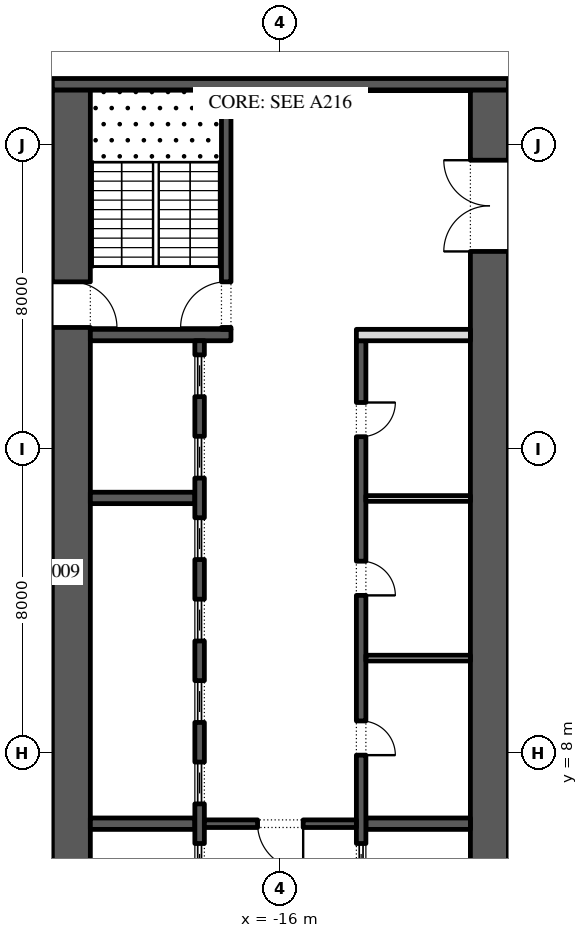
"""IFC4 building model, lengths in metres.
Left out: names, types, materials, properties, quantities, classifications, styles, units other than length and angle.
Written with IfcOpenShell. Run it as: python <this file> out.ifc"""

import sys

from ifc_helpers import new_model, si_unit, direction, frame, frame_2d, origin, place, context, subcontext, project, spatial, rectangle, extrude, element, fill, save


model = new_model("IFC4")
c1 = context("Model", 3, precision=1e-05, world=origin(), true_north=direction((0.0, 1.0)))
c2 = subcontext(c1, "Body", "Model", "MODEL_VIEW")
j1 = project(units=[si_unit("LENGTHUNIT", "METRE"), si_unit("PLANEANGLEUNIT", "RADIAN")], contexts=[c1])
p1 = place(None, origin())
s1 = spatial("IfcSite", under=j1, at=p1, CompositionType="ELEMENT")
p2 = place(p1, origin())
s2 = spatial("IfcBuilding", under=s1, at=p2, CompositionType="ELEMENT")
p3 = place(p2, frame((0.0, 0.0, 64.8)))
s3 = spatial("IfcBuildingStorey", under=s2, at=p3, CompositionType="ELEMENT", Elevation=64.8)
p4 = place(p3, frame((-21.5, -2.45, 0.0), z_axis=(0.0, 0.0, 1.0), x_axis=(0.0, 1.0, 0.0)))
e1 = element("IfcWall", 1, at=p4, inside=s3, PredefinedType="SHEAR", context=c2, shape_type="SweptSolid", body=[
    extrude(rectangle(XDim=27.9, YDim=1.0, at=frame_2d((13.95, 0.0))), origin(), (0.0, 0.0, 1.0), 4.0),
])
p5 = place(p4, frame((5.05, 0.0, 0.0)))
e2 = element("IfcOpeningElement", 2, at=p5, cuts=e1, PredefinedType="OPENING", context=c2, shape_type="SweptSolid", body=[
    extrude(rectangle(XDim=1.2, YDim=2.1, at=frame_2d((0.6, 1.05))), frame((0.0, 0.51, 0.0), z_axis=(0.0, -1.0, 0.0), x_axis=(1.0, 0.0, 0.0)), (0.0, 0.0, 1.0), 1.02),
])
p6 = place(p4, frame((21.65, 0.0, 0.0)))
e3 = element("IfcOpeningElement", 3, at=p6, cuts=e1, PredefinedType="OPENING", context=c2, shape_type="SweptSolid", body=[
    extrude(rectangle(XDim=1.2, YDim=2.1, at=frame_2d((0.6, 1.05))), frame((0.0, 0.51, 0.0), z_axis=(0.0, -1.0, 0.0), x_axis=(1.0, 0.0, 0.0)), (0.0, 0.0, 1.0), 1.02),
])
p7 = place(p3, frame((-10.5, -2.45, 0.0), z_axis=(0.0, 0.0, 1.0), x_axis=(0.0, 1.0, 0.0)))
e4 = element("IfcWall", 4, at=p7, inside=s3, PredefinedType="SHEAR", context=c2, shape_type="SweptSolid", body=[
    extrude(rectangle(XDim=27.9, YDim=1.0, at=frame_2d((13.95, 0.0))), origin(), (0.0, 0.0, 1.0), 4.0),
])
p8 = place(p7, frame((23.65, 0.0, 0.0)))
e5 = element("IfcOpeningElement", 5, at=p8, cuts=e4, PredefinedType="OPENING", context=c2, shape_type="SweptSolid", body=[
    extrude(rectangle(XDim=2.4, YDim=2.1, at=frame_2d((1.2, 1.05))), frame((0.0, 0.51, 0.0), z_axis=(0.0, -1.0, 0.0), x_axis=(1.0, 0.0, 0.0)), (0.0, 0.0, 1.0), 1.02),
])
p9 = place(p7, frame((0.788, 0.0, 0.0)))
e6 = element("IfcOpeningElement", 6, at=p9, cuts=e4, PredefinedType="OPENING", context=c2, shape_type="SweptSolid", body=[
    extrude(rectangle(XDim=0.9, YDim=2.1, at=frame_2d((0.45, 1.05))), frame((0.0, 0.51, 0.0), z_axis=(0.0, -1.0, 0.0), x_axis=(1.0, 0.0, 0.0)), (0.0, 0.0, 1.0), 1.02),
])
p10 = place(p7, frame((4.012, 0.0, 0.0)))
e7 = element("IfcOpeningElement", 7, at=p10, cuts=e4, PredefinedType="OPENING", context=c2, shape_type="SweptSolid", body=[
    extrude(rectangle(XDim=0.9, YDim=2.1, at=frame_2d((0.45, 1.05))), frame((0.0, 0.51, 0.0), z_axis=(0.0, -1.0, 0.0), x_axis=(1.0, 0.0, 0.0)), (0.0, 0.0, 1.0), 1.02),
])
p11 = place(p3, frame((-22.0, 25.6, 0.0), z_axis=(0.0, 0.0, 1.0), x_axis=(1.0, 0.0, 0.0)))
e8 = element("IfcWall", 8, at=p11, inside=s3, PredefinedType="SHEAR", context=c2, shape_type="SweptSolid", body=[
    extrude(rectangle(XDim=12.0, YDim=0.3, at=frame_2d((6.0, 0.0))), origin(), (0.0, 0.0, 1.0), 4.0),
])
p12 = place(p3, frame((-21.0, 19.0, 0.0), z_axis=(0.0, 0.0, 1.0), x_axis=(1.0, 0.0, 0.0)))
e9 = element("IfcWall", 9, at=p12, inside=s3, PredefinedType="SHEAR", context=c2, shape_type="SweptSolid", body=[
    extrude(rectangle(XDim=3.7, YDim=0.3, at=frame_2d((1.85, 0.0))), origin(), (0.0, 0.0, 1.0), 4.0),
])
p13 = place(p3, frame((-17.425, 19.15, 0.0), z_axis=(0.0, 0.0, 1.0), x_axis=(0.0, 1.0, 0.0)))
e10 = element("IfcWall", 10, at=p13, inside=s3, PredefinedType="SHEAR", context=c2, shape_type="SweptSolid", body=[
    extrude(rectangle(XDim=6.3, YDim=0.25, at=frame_2d((3.15, 0.0))), origin(), (0.0, 0.0, 1.0), 4.0),
])
p14 = place(p13, frame((0.05, 0.0, 0.0)))
e11 = element("IfcOpeningElement", 11, at=p14, cuts=e10, PredefinedType="OPENING", context=c2, shape_type="SweptSolid", body=[
    extrude(rectangle(XDim=1.2, YDim=2.1, at=frame_2d((0.6, 1.05))), frame((0.0, 0.135, 0.0), z_axis=(0.0, -1.0, 0.0), x_axis=(1.0, 0.0, 0.0)), (0.0, 0.0, 1.0), 0.27),
])
for number, where, z_axis, x_axis in (
    (12, (-21.0, 6.143, 0.0), (0.0, 0.0, 1.0), (1.0, 0.0, 0.0)),
    (13, (-21.0, 14.714, 0.0), (0.0, 0.0, 1.0), (1.0, 0.0, 0.0)),
):
    element("IfcWall", number, at=place(p3, frame(where, z_axis=z_axis, x_axis=x_axis)), inside=s3, PredefinedType="SHEAR", context=c2, shape_type="SweptSolid", body=[
        extrude(rectangle(XDim=2.75, YDim=0.3, at=frame_2d((1.375, 0.0))), origin(), (0.0, 0.0, 1.0), 4.0),
    ])
p15 = place(p3, frame((-18.125, 4.15, 0.0), z_axis=(0.0, 0.0, 1.0), x_axis=(0.0, 1.0, 0.0)))
e14 = element("IfcWall", 14, at=p15, inside=s3, PredefinedType="SHEAR", context=c2, shape_type="SweptSolid", body=[
    extrude(rectangle(XDim=14.7, YDim=0.25, at=frame_2d((7.35, 0.0))), origin(), (0.0, 0.0, 1.0), 4.0),
])
p16 = place(p15, frame((0.371, 0.0, 0.0)))
e15 = element("IfcOpeningElement", 15, at=p16, cuts=e14, PredefinedType="OPENING", context=c2, shape_type="SweptSolid", body=[
    extrude(rectangle(XDim=1.1, YDim=2.1, at=frame_2d((0.55, 1.05))), frame((0.0, 0.135, 0.0), z_axis=(0.0, -1.0, 0.0), x_axis=(1.0, 0.0, 0.0)), (0.0, 0.0, 1.0), 0.27),
])
p17 = place(p15, frame((2.514, 0.0, 0.0)))
e16 = element("IfcOpeningElement", 16, at=p17, cuts=e14, PredefinedType="OPENING", context=c2, shape_type="SweptSolid", body=[
    extrude(rectangle(XDim=1.1, YDim=2.1, at=frame_2d((0.55, 1.05))), frame((0.0, 0.135, 0.0), z_axis=(0.0, -1.0, 0.0), x_axis=(1.0, 0.0, 0.0)), (0.0, 0.0, 1.0), 0.27),
])
p18 = place(p15, frame((4.657, 0.0, 0.0)))
e17 = element("IfcOpeningElement", 17, at=p18, cuts=e14, PredefinedType="OPENING", context=c2, shape_type="SweptSolid", body=[
    extrude(rectangle(XDim=1.1, YDim=2.1, at=frame_2d((0.55, 1.05))), frame((0.0, 0.135, 0.0), z_axis=(0.0, -1.0, 0.0), x_axis=(1.0, 0.0, 0.0)), (0.0, 0.0, 1.0), 0.27),
])
p19 = place(p15, frame((6.8, 0.0, 0.0)))
e18 = element("IfcOpeningElement", 18, at=p19, cuts=e14, PredefinedType="OPENING", context=c2, shape_type="SweptSolid", body=[
    extrude(rectangle(XDim=1.1, YDim=2.1, at=frame_2d((0.55, 1.05))), frame((0.0, 0.135, 0.0), z_axis=(0.0, -1.0, 0.0), x_axis=(1.0, 0.0, 0.0)), (0.0, 0.0, 1.0), 0.27),
])
p20 = place(p15, frame((8.943, 0.0, 0.0)))
e19 = element("IfcOpeningElement", 19, at=p20, cuts=e14, PredefinedType="OPENING", context=c2, shape_type="SweptSolid", body=[
    extrude(rectangle(XDim=1.1, YDim=2.1, at=frame_2d((0.55, 1.05))), frame((0.0, 0.135, 0.0), z_axis=(0.0, -1.0, 0.0), x_axis=(1.0, 0.0, 0.0)), (0.0, 0.0, 1.0), 0.27),
])
p21 = place(p15, frame((11.086, 0.0, 0.0)))
e20 = element("IfcOpeningElement", 20, at=p21, cuts=e14, PredefinedType="OPENING", context=c2, shape_type="SweptSolid", body=[
    extrude(rectangle(XDim=1.1, YDim=2.1, at=frame_2d((0.55, 1.05))), frame((0.0, 0.135, 0.0), z_axis=(0.0, -1.0, 0.0), x_axis=(1.0, 0.0, 0.0)), (0.0, 0.0, 1.0), 0.27),
])
p22 = place(p15, frame((13.229, 0.0, 0.0)))
e21 = element("IfcOpeningElement", 21, at=p22, cuts=e14, PredefinedType="OPENING", context=c2, shape_type="SweptSolid", body=[
    extrude(rectangle(XDim=1.1, YDim=2.1, at=frame_2d((0.55, 1.05))), frame((0.0, 0.135, 0.0), z_axis=(0.0, -1.0, 0.0), x_axis=(1.0, 0.0, 0.0)), (0.0, 0.0, 1.0), 0.27),
])
p23 = place(p3, frame((-13.75, 6.143, 0.0), z_axis=(0.0, 0.0, 1.0), x_axis=(1.0, 0.0, 0.0)))
e22 = element("IfcWall", 22, at=p23, inside=s3, PredefinedType="SHEAR", context=c2, shape_type="SweptSolid", body=[
    extrude(rectangle(XDim=2.75, YDim=0.3, at=frame_2d((1.375, 0.0))), origin(), (0.0, 0.0, 1.0), 4.0),
])
p24 = place(p3, frame((-13.875, -2.45, 0.0), z_axis=(0.0, 0.0, 1.0), x_axis=(0.0, 1.0, 0.0)))
e23 = element("IfcWall", 23, at=p24, inside=s3, PredefinedType="SHEAR", context=c2, shape_type="SweptSolid", body=[
    extrude(rectangle(XDim=21.3, YDim=0.25, at=frame_2d((10.65, 0.0))), origin(), (0.0, 0.0, 1.0), 4.0),
])
p25 = place(p24, frame((10.396, 0.0, 0.0)))
e24 = element("IfcOpeningElement", 24, at=p25, cuts=e23, PredefinedType="OPENING", context=c2, shape_type="SweptSolid", body=[
    extrude(rectangle(XDim=0.9, YDim=2.1, at=frame_2d((0.45, 1.05))), frame((0.0, 0.135, 0.0), z_axis=(0.0, -1.0, 0.0), x_axis=(1.0, 0.0, 0.0)), (0.0, 0.0, 1.0), 0.27),
])
p26 = place(p24, frame((14.6, 0.0, 0.0)))
e25 = element("IfcOpeningElement", 25, at=p26, cuts=e23, PredefinedType="OPENING", context=c2, shape_type="SweptSolid", body=[
    extrude(rectangle(XDim=0.9, YDim=2.1, at=frame_2d((0.45, 1.05))), frame((0.0, 0.135, 0.0), z_axis=(0.0, -1.0, 0.0), x_axis=(1.0, 0.0, 0.0)), (0.0, 0.0, 1.0), 0.27),
])
p27 = place(p24, frame((18.775, 0.0, 0.0)))
e26 = element("IfcOpeningElement", 26, at=p27, cuts=e23, PredefinedType="OPENING", context=c2, shape_type="SweptSolid", body=[
    extrude(rectangle(XDim=0.9, YDim=2.1, at=frame_2d((0.45, 1.05))), frame((0.0, 0.135, 0.0), z_axis=(0.0, -1.0, 0.0), x_axis=(1.0, 0.0, 0.0)), (0.0, 0.0, 1.0), 0.27),
])
p28 = place(p24, frame((6.971, 0.0, 0.0)))
e27 = element("IfcOpeningElement", 27, at=p28, cuts=e23, PredefinedType="OPENING", context=c2, shape_type="SweptSolid", body=[
    extrude(rectangle(XDim=1.1, YDim=2.1, at=frame_2d((0.55, 1.05))), frame((0.0, 0.135, 0.0), z_axis=(0.0, -1.0, 0.0), x_axis=(1.0, 0.0, 0.0)), (0.0, 0.0, 1.0), 0.27),
])
p29 = place(p3, frame((-14.0, 19.0, 0.0), z_axis=(0.0, 0.0, 1.0), x_axis=(1.0, 0.0, 0.0)))
e28 = element("IfcWall", 28, at=p29, inside=s3, PredefinedType="PARTITIONING", context=c2, shape_type="SweptSolid", body=[
    extrude(rectangle(XDim=3.0, YDim=0.3, at=frame_2d((1.5, 0.0))), origin(), (0.0, 0.0, 1.0), 4.0),
])
for number, where, z_axis, x_axis in (
    (29, (-13.75, 10.5, 0.0), (0.0, 0.0, 1.0), (1.0, 0.0, 0.0)),
    (30, (-13.75, 14.7, 0.0), (0.0, 0.0, 1.0), (1.0, 0.0, 0.0)),
):
    element("IfcWall", number, at=place(p3, frame(where, z_axis=z_axis, x_axis=x_axis)), inside=s3, PredefinedType="PARTITIONING", context=c2, shape_type="SweptSolid", body=[
        extrude(rectangle(XDim=2.75, YDim=0.15, at=frame_2d((1.375, 0.0))), origin(), (0.0, 0.0, 1.0), 4.0),
    ])
p30 = place(p3, frame((-18.0, 6.143, 0.0), z_axis=(0.0, 0.0, 1.0), x_axis=(1.0, 0.0, 0.0)))
e31 = element("IfcWall", 31, at=p30, inside=s3, PredefinedType="SHEAR", context=c2, shape_type="SweptSolid", body=[
    extrude(rectangle(XDim=4.0, YDim=0.2, at=frame_2d((2.0, 0.0))), origin(), (0.0, 0.0, 1.0), 4.0),
])
p31 = place(p30, frame((1.4, 0.0, 0.0)))
e32 = element("IfcOpeningElement", 32, at=p31, cuts=e31, PredefinedType="OPENING", context=c2, shape_type="SweptSolid", body=[
    extrude(rectangle(XDim=1.2, YDim=2.1, at=frame_2d((0.6, 1.05))), frame((0.0, 0.11, 0.0), z_axis=(0.0, -1.0, 0.0), x_axis=(1.0, 0.0, 0.0)), (0.0, 0.0, 1.0), 0.22),
])
p32 = place(p16, origin())
e33 = element("IfcDoor", 33, at=p32, inside=s3, OperationType="SLIDING_TO_LEFT", PredefinedType="DOOR", context=c2, shape_type="SweptSolid", body=[
    extrude(rectangle(XDim=1.1, YDim=2.1, at=frame_2d((0.55, 1.05))), frame((0.0, 0.025, 0.0), z_axis=(0.0, -1.0, 0.0), x_axis=(1.0, 0.0, 0.0)), (0.0, 0.0, 1.0), 0.05),
])
fill(e15, e33)
p33 = place(p17, origin())
e34 = element("IfcDoor", 34, at=p33, inside=s3, OperationType="SLIDING_TO_LEFT", PredefinedType="DOOR", context=c2, shape_type="SweptSolid", body=[
    extrude(rectangle(XDim=1.1, YDim=2.1, at=frame_2d((0.55, 1.05))), frame((0.0, 0.025, 0.0), z_axis=(0.0, -1.0, 0.0), x_axis=(1.0, 0.0, 0.0)), (0.0, 0.0, 1.0), 0.05),
])
fill(e16, e34)
p34 = place(p18, origin())
e35 = element("IfcDoor", 35, at=p34, inside=s3, OperationType="SLIDING_TO_LEFT", PredefinedType="DOOR", context=c2, shape_type="SweptSolid", body=[
    extrude(rectangle(XDim=1.1, YDim=2.1, at=frame_2d((0.55, 1.05))), frame((0.0, 0.025, 0.0), z_axis=(0.0, -1.0, 0.0), x_axis=(1.0, 0.0, 0.0)), (0.0, 0.0, 1.0), 0.05),
])
fill(e17, e35)
p35 = place(p19, origin())
e36 = element("IfcDoor", 36, at=p35, inside=s3, OperationType="SLIDING_TO_LEFT", PredefinedType="DOOR", context=c2, shape_type="SweptSolid", body=[
    extrude(rectangle(XDim=1.1, YDim=2.1, at=frame_2d((0.55, 1.05))), frame((0.0, 0.025, 0.0), z_axis=(0.0, -1.0, 0.0), x_axis=(1.0, 0.0, 0.0)), (0.0, 0.0, 1.0), 0.05),
])
fill(e18, e36)
p36 = place(p20, origin())
e37 = element("IfcDoor", 37, at=p36, inside=s3, OperationType="SLIDING_TO_LEFT", PredefinedType="DOOR", context=c2, shape_type="SweptSolid", body=[
    extrude(rectangle(XDim=1.1, YDim=2.1, at=frame_2d((0.55, 1.05))), frame((0.0, 0.025, 0.0), z_axis=(0.0, -1.0, 0.0), x_axis=(1.0, 0.0, 0.0)), (0.0, 0.0, 1.0), 0.05),
])
fill(e19, e37)
p37 = place(p21, origin())
e38 = element("IfcDoor", 38, at=p37, inside=s3, OperationType="SLIDING_TO_LEFT", PredefinedType="DOOR", context=c2, shape_type="SweptSolid", body=[
    extrude(rectangle(XDim=1.1, YDim=2.1, at=frame_2d((0.55, 1.05))), frame((0.0, 0.025, 0.0), z_axis=(0.0, -1.0, 0.0), x_axis=(1.0, 0.0, 0.0)), (0.0, 0.0, 1.0), 0.05),
])
fill(e20, e38)
p38 = place(p22, origin())
e39 = element("IfcDoor", 39, at=p38, inside=s3, OperationType="SLIDING_TO_LEFT", PredefinedType="DOOR", context=c2, shape_type="SweptSolid", body=[
    extrude(rectangle(XDim=1.1, YDim=2.1, at=frame_2d((0.55, 1.05))), frame((0.0, 0.025, 0.0), z_axis=(0.0, -1.0, 0.0), x_axis=(1.0, 0.0, 0.0)), (0.0, 0.0, 1.0), 0.05),
])
fill(e21, e39)
p39 = place(p25, frame((0.9, -0.2, 0.0), z_axis=(0.0, 0.0, 1.0), x_axis=(-1.0, 0.0, 0.0)))
e40 = element("IfcDoor", 40, at=p39, inside=s3, OperationType="SINGLE_SWING_LEFT", PredefinedType="DOOR", context=c2, shape_type="SweptSolid", body=[
    extrude(rectangle(XDim=0.9, YDim=2.1, at=frame_2d((0.45, 1.05))), frame((0.0, -0.075, 0.0), z_axis=(0.0, -1.0, 0.0), x_axis=(1.0, 0.0, 0.0)), (0.0, 0.0, 1.0), 0.05),
])
fill(e24, e40)
p40 = place(p26, frame((0.9, -0.2, 0.0), z_axis=(0.0, 0.0, 1.0), x_axis=(-1.0, 0.0, 0.0)))
e41 = element("IfcDoor", 41, at=p40, inside=s3, OperationType="SINGLE_SWING_LEFT", PredefinedType="DOOR", context=c2, shape_type="SweptSolid", body=[
    extrude(rectangle(XDim=0.9, YDim=2.1, at=frame_2d((0.45, 1.05))), frame((0.0, -0.075, 0.0), z_axis=(0.0, -1.0, 0.0), x_axis=(1.0, 0.0, 0.0)), (0.0, 0.0, 1.0), 0.05),
])
fill(e25, e41)
p41 = place(p27, frame((0.9, -0.2, 0.0), z_axis=(0.0, 0.0, 1.0), x_axis=(-1.0, 0.0, 0.0)))
e42 = element("IfcDoor", 42, at=p41, inside=s3, OperationType="SINGLE_SWING_RIGHT", PredefinedType="DOOR", context=c2, shape_type="SweptSolid", body=[
    extrude(rectangle(XDim=0.9, YDim=2.1, at=frame_2d((0.45, 1.05))), frame((0.0, -0.075, 0.0), z_axis=(0.0, -1.0, 0.0), x_axis=(1.0, 0.0, 0.0)), (0.0, 0.0, 1.0), 0.05),
])
fill(e26, e42)
p42 = place(p28, origin())
e43 = element("IfcDoor", 43, at=p42, inside=s3, OperationType="SLIDING_TO_LEFT", PredefinedType="DOOR", context=c2, shape_type="SweptSolid", body=[
    extrude(rectangle(XDim=1.1, YDim=2.1, at=frame_2d((0.55, 1.05))), frame((0.0, 0.025, 0.0), z_axis=(0.0, -1.0, 0.0), x_axis=(1.0, 0.0, 0.0)), (0.0, 0.0, 1.0), 0.05),
])
fill(e27, e43)
p43 = place(p31, frame((1.2, 0.0, 0.0), z_axis=(0.0, 0.0, 1.0), x_axis=(-1.0, 0.0, 0.0)))
e44 = element("IfcDoor", 44, at=p43, inside=s3, OperationType="SINGLE_SWING_RIGHT", PredefinedType="DOOR", context=c2, shape_type="SweptSolid", body=[
    extrude(rectangle(XDim=1.2, YDim=2.1, at=frame_2d((0.6, 1.05))), frame((0.0, 0.025, 0.0), z_axis=(0.0, -1.0, 0.0), x_axis=(1.0, 0.0, 0.0)), (0.0, 0.0, 1.0), 0.05),
])
fill(e32, e44)
p44 = place(p8, origin())
e45 = element("IfcDoor", 45, at=p44, inside=s3, OperationType="DOUBLE_DOOR_SINGLE_SWING", PredefinedType="DOOR", context=c2, shape_type="SweptSolid", body=[
    extrude(rectangle(XDim=2.4, YDim=2.1, at=frame_2d((1.2, 1.05))), frame((0.0, 0.025, 0.0), z_axis=(0.0, -1.0, 0.0), x_axis=(1.0, 0.0, 0.0)), (0.0, 0.0, 1.0), 0.05),
])
fill(e5, e45)
p45 = place(p14, origin())
e46 = element("IfcDoor", 46, at=p45, inside=s3, OperationType="SINGLE_SWING_RIGHT", PredefinedType="DOOR", context=c2, shape_type="SweptSolid", body=[
    extrude(rectangle(XDim=1.2, YDim=2.1, at=frame_2d((0.6, 1.05))), frame((0.0, 0.025, 0.0), z_axis=(0.0, -1.0, 0.0), x_axis=(1.0, 0.0, 0.0)), (0.0, 0.0, 1.0), 0.05),
])
fill(e11, e46)
p46 = place(p6, frame((1.2, 0.0, 0.0), z_axis=(0.0, 0.0, 1.0), x_axis=(-1.0, 0.0, 0.0)))
e47 = element("IfcDoor", 47, at=p46, inside=s3, OperationType="SINGLE_SWING_LEFT", PredefinedType="DOOR", context=c2, shape_type="SweptSolid", body=[
    extrude(rectangle(XDim=1.2, YDim=2.1, at=frame_2d((0.6, 1.05))), frame((0.0, 0.025, 0.0), z_axis=(0.0, -1.0, 0.0), x_axis=(1.0, 0.0, 0.0)), (0.0, 0.0, 1.0), 0.05),
])
fill(e3, e47)
save(model, sys.argv[1])
